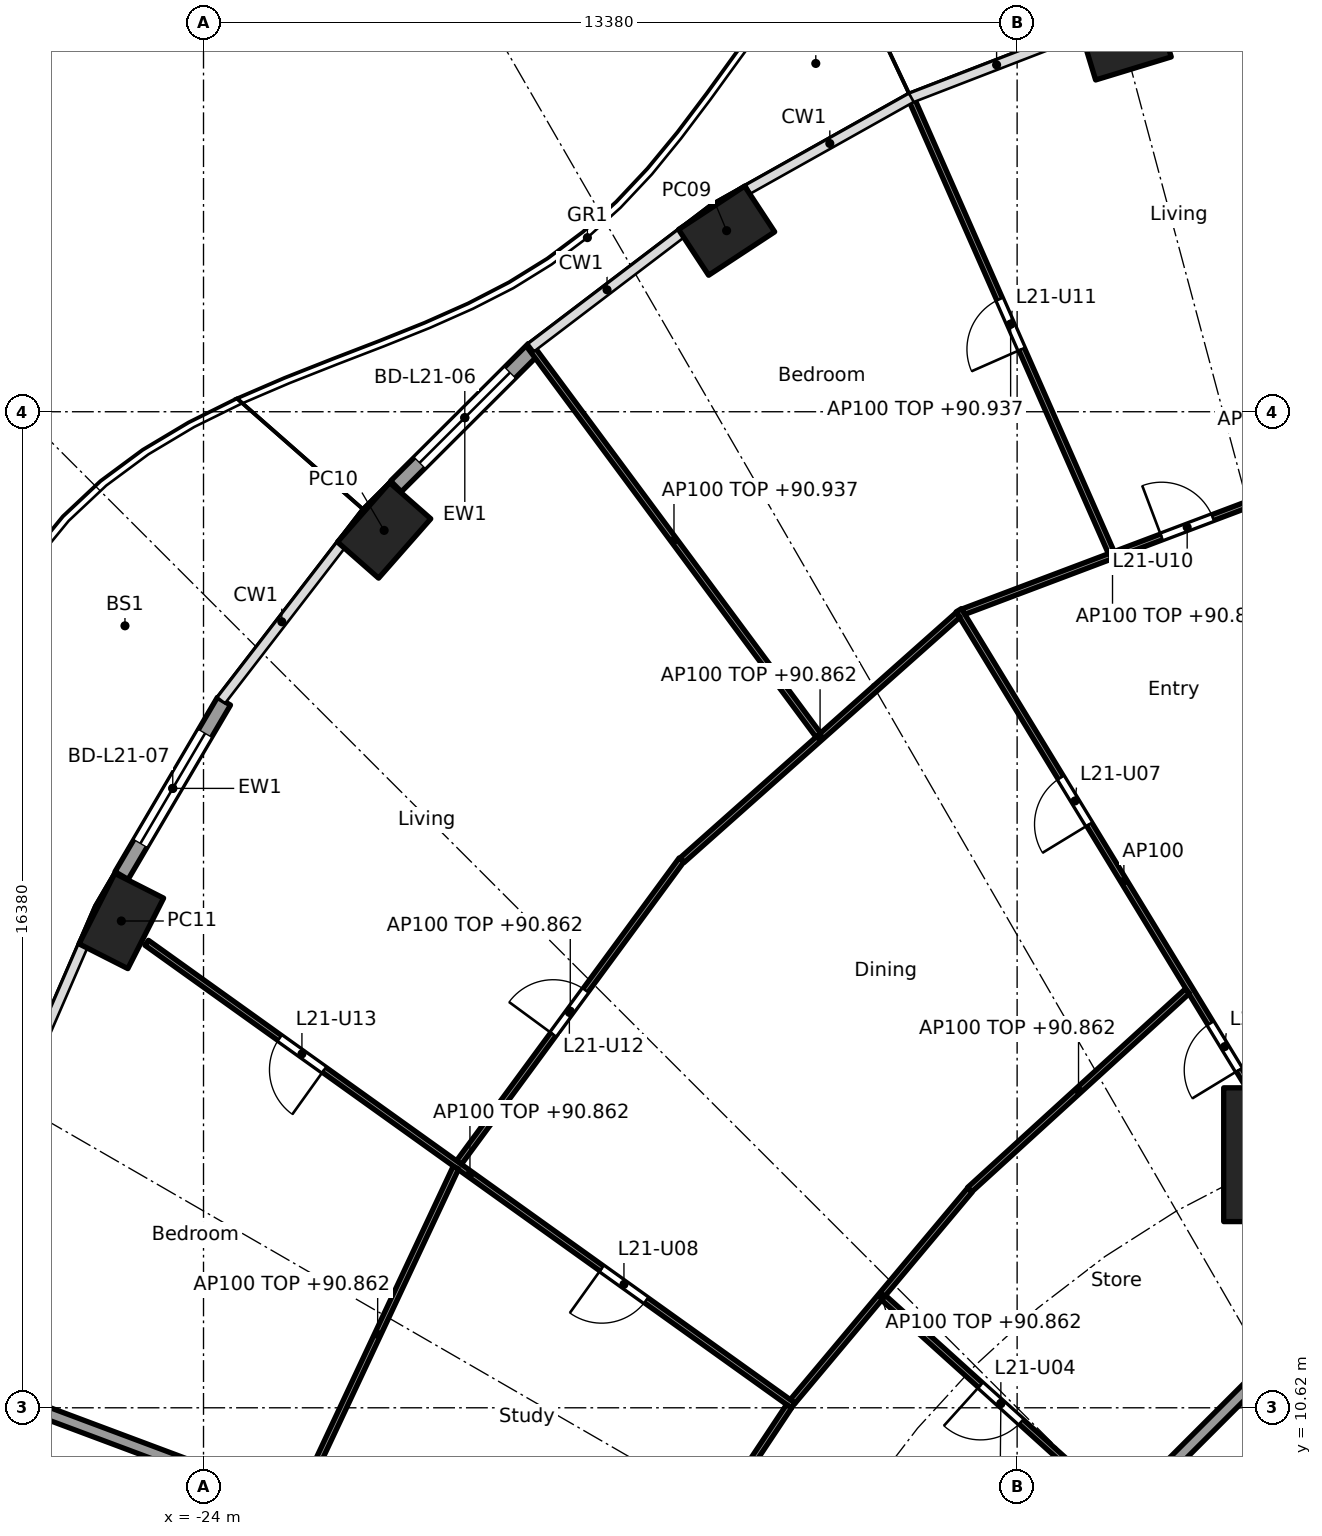
"""IFC4 building model, lengths in metres.
Left out: names, types, materials, properties, quantities, classifications, styles, units other than length and angle.
Written with IfcOpenShell. Run it as: python <this file> out.ifc"""

import sys

from ifc_helpers import new_model, si_unit, direction, frame, frame_2d, origin, origin_2d, place, context, subcontext, project, spatial, rectangle, hollow_rectangle, extrude, element, fill, save


model = new_model("IFC4")
c1 = context("Model", 3, precision=1e-05, world=origin(), true_north=direction((0.0, 1.0)))
c2 = subcontext(c1, "Body", "Model", "MODEL_VIEW")
j1 = project(units=[si_unit("LENGTHUNIT", "METRE"), si_unit("PLANEANGLEUNIT", "RADIAN")], contexts=[c1])
p1 = place(None, origin())
s1 = spatial("IfcSite", under=j1, at=p1, CompositionType="ELEMENT")
p2 = place(p1, origin())
s2 = spatial("IfcBuilding", under=s1, at=p2, CompositionType="ELEMENT")
p3 = place(p2, frame((0.0, 0.0, 88.1)))
s3 = spatial("IfcBuildingStorey", under=s2, at=p3, CompositionType="ELEMENT", Elevation=88.1)
for number, where, z_axis, x_axis in (
    (1, (-8.839, 33.076, 0.0), (0.0, 0.0, 1.0), (-0.957, -0.292, 0.0)),
    (2, (-15.397, 29.978, 0.0), (0.0, 0.0, 1.0), (-0.836, -0.549, 0.0)),
    (3, (-21.03, 25.049, 0.0), (0.0, 0.0, 1.0), (-0.66, -0.751, 0.0)),
    (4, (-25.352, 18.625, 0.0), (0.0, 0.0, 1.0), (-0.452, -0.892, 0.0)),
):
    element("IfcColumn", number, at=place(p3, frame(where, z_axis=z_axis, x_axis=x_axis)), inside=s3, PredefinedType="COLUMN", context=c2, shape_type="SweptSolid", body=[
        extrude(hollow_rectangle(XDim=1.3, YDim=0.9, WallThickness=0.045, at=origin_2d()), origin(), (0.0, 0.0, 1.0), 3.7),
    ])
p4 = place(p3, frame((-6.123, 14.782, 0.0), z_axis=(0.0, 0.0, 1.0), x_axis=(1.0, 0.0, 0.0)))
e5 = element("IfcColumn", 5, at=p4, inside=s3, PredefinedType="COLUMN", context=c2, shape_type="SweptSolid", body=[
    extrude(rectangle(XDim=2.2, YDim=2.2, at=origin_2d()), origin(), (0.0, 0.0, 1.0), 3.7),
])
p5 = place(p3, frame((-20.835, 25.773, 0.0), z_axis=(0.0, 0.0, 1.0), x_axis=(0.707831646613, 0.706381171927, 0.0)))
e6 = element("IfcWall", 6, at=p5, inside=s3, PredefinedType="SOLIDWALL", context=c2, shape_type="SweptSolid", body=[
    extrude(rectangle(XDim=3.198, YDim=0.25, at=frame_2d((1.599, 0.0))), origin(), (0.0, 0.0, 1.0), 3.44),
])
p6 = place(p5, frame((0.549, 0.0, 0.0)))
e7 = element("IfcOpeningElement", 7, at=p6, cuts=e6, PredefinedType="OPENING", context=c2, shape_type="SweptSolid", body=[
    extrude(rectangle(XDim=2.1, YDim=2.4, at=frame_2d((1.05, 1.2))), frame((0.0, 0.135, 0.0), z_axis=(0.0, -1.0, 0.0), x_axis=(1.0, 0.0, 0.0)), (0.0, 0.0, 1.0), 0.27),
])
p7 = place(p3, frame((-25.348, 19.372, 0.0), z_axis=(0.0, 0.0, 1.0), x_axis=(0.506352525095, 0.86232657406, 0.0)))
e8 = element("IfcWall", 8, at=p7, inside=s3, PredefinedType="SOLIDWALL", context=c2, shape_type="SweptSolid", body=[
    extrude(rectangle(XDim=3.325, YDim=0.25, at=frame_2d((1.663, 0.0))), origin(), (0.0, 0.0, 1.0), 3.44),
])
p8 = place(p7, frame((0.612, 0.0, 0.0)))
e9 = element("IfcOpeningElement", 9, at=p8, cuts=e8, PredefinedType="OPENING", context=c2, shape_type="SweptSolid", body=[
    extrude(rectangle(XDim=2.1, YDim=2.4, at=frame_2d((1.05, 1.2))), frame((0.0, 0.135, 0.0), z_axis=(0.0, -1.0, 0.0), x_axis=(1.0, 0.0, 0.0)), (0.0, 0.0, 1.0), 0.27),
])
p9 = place(p3, frame((-4.613, 9.988, 0.0), z_axis=(0.0, 0.0, 1.0), x_axis=(-0.707106781187, -0.707106781187, 0.0)))
e10 = element("IfcWall", 10, at=p9, inside=s3, PredefinedType="SHEAR", context=c2, shape_type="SweptSolid", body=[
    extrude(rectangle(XDim=7.602, YDim=0.6, at=frame_2d((3.801, 0.0))), origin(), (0.0, 0.0, 1.0), 3.44),
])
p10 = place(p9, frame((0.351, 0.0, 0.0)))
e11 = element("IfcOpeningElement", 11, at=p10, cuts=e10, PredefinedType="OPENING", context=c2, shape_type="SweptSolid", body=[
    extrude(rectangle(XDim=1.1, YDim=2.1, at=frame_2d((0.55, 1.05))), frame((0.0, 0.31, 0.0), z_axis=(0.0, -1.0, 0.0), x_axis=(1.0, 0.0, 0.0)), (0.0, 0.0, 1.0), 0.62),
])
p11 = place(p3, frame((-14.829, 6.14, 0.0), z_axis=(0.0, 0.0, 1.0), x_axis=(-0.936597324342, 0.35040755134, 0.0)))
e12 = element("IfcWall", 12, at=p11, inside=s3, PredefinedType="PARTITIONING", context=c2, shape_type="SweptSolid", body=[
    extrude(rectangle(XDim=13.606, YDim=0.2, at=frame_2d((6.803, 0.0))), origin(), (0.0, 0.0, 1.0), 2.762),
])
p12 = place(p3, frame((-5.275, 12.494, 0.0), z_axis=(0.0, 0.0, 1.0), x_axis=(-0.707106781187, -0.707106781187, 0.0)))
e13 = element("IfcWall", 13, at=p12, inside=s3, PredefinedType="PARTITIONING", context=c2, shape_type="SweptSolid", body=[
    extrude(rectangle(XDim=10.209, YDim=0.2, at=frame_2d((5.104, 0.0))), origin(), (0.0, 0.0, 1.0), 3.44),
])
p13 = place(p3, frame((-6.596, 25.563, 0.0), z_axis=(0.0, 0.0, 1.0), x_axis=(-0.9356162121, -0.353018843201, 0.0)))
e14 = element("IfcWall", 14, at=p13, inside=s3, PredefinedType="PARTITIONING", context=c2, shape_type="SweptSolid", body=[
    extrude(rectangle(XDim=5.249, YDim=0.1, at=frame_2d((2.625, 0.0))), origin(), (0.0, 0.0, 1.0), 2.762),
])
p14 = place(p13, frame((0.862, 0.0, 0.0)))
e15 = element("IfcOpeningElement", 15, at=p14, cuts=e14, PredefinedType="OPENING", context=c2, shape_type="SweptSolid", body=[
    extrude(rectangle(XDim=0.9, YDim=2.1, at=frame_2d((0.45, 1.05))), frame((0.0, 0.06, 0.0), z_axis=(0.0, -1.0, 0.0), x_axis=(1.0, 0.0, 0.0)), (0.0, 0.0, 1.0), 0.12),
])
p15 = place(p3, frame((-9.072, 24.683, 0.0), z_axis=(0.0, 0.0, 1.0), x_axis=(-0.403192911159, 0.915115007194, 0.0)))
e16 = element("IfcWall", 16, at=p15, inside=s3, PredefinedType="PARTITIONING", context=c2, shape_type="SweptSolid", body=[
    extrude(rectangle(XDim=8.211, YDim=0.1, at=frame_2d((4.106, 0.0))), origin(), (0.0, 0.0, 1.0), 2.837),
])
p16 = place(p15, frame((3.656, 0.0, 0.0)))
e17 = element("IfcOpeningElement", 17, at=p16, cuts=e16, PredefinedType="OPENING", context=c2, shape_type="SweptSolid", body=[
    extrude(rectangle(XDim=0.9, YDim=2.1, at=frame_2d((0.45, 1.05))), frame((0.0, 0.06, 0.0), z_axis=(0.0, -1.0, 0.0), x_axis=(1.0, 0.0, 0.0)), (0.0, 0.0, 1.0), 0.12),
])
p17 = place(p3, frame((-6.149, 14.825, 0.0), z_axis=(0.0, 0.0, 1.0), x_axis=(-0.520411490252, 0.853915616917, 0.0)))
e18 = element("IfcWall", 18, at=p17, inside=s3, PredefinedType="PARTITIONING", context=c2, shape_type="SweptSolid", body=[
    extrude(rectangle(XDim=10.435, YDim=0.1, at=frame_2d((5.218, 0.0))), origin(), (0.0, 0.0, 1.0), 3.44),
])
p18 = place(p17, frame((1.582, 0.0, 0.0)))
e19 = element("IfcOpeningElement", 19, at=p18, cuts=e18, PredefinedType="OPENING", context=c2, shape_type="SweptSolid", body=[
    extrude(rectangle(XDim=0.9, YDim=2.1, at=frame_2d((0.45, 1.05))), frame((0.0, 0.06, 0.0), z_axis=(0.0, -1.0, 0.0), x_axis=(1.0, 0.0, 0.0)), (0.0, 0.0, 1.0), 0.12),
])
p19 = place(p17, frame((6.312, 0.0, 0.0)))
e20 = element("IfcOpeningElement", 20, at=p19, cuts=e18, PredefinedType="OPENING", context=c2, shape_type="SweptSolid", body=[
    extrude(rectangle(XDim=0.9, YDim=2.1, at=frame_2d((0.45, 1.05))), frame((0.0, 0.06, 0.0), z_axis=(0.0, -1.0, 0.0), x_axis=(1.0, 0.0, 0.0)), (0.0, 0.0, 1.0), 0.12),
])
p20 = place(p3, frame((-7.82, 17.472, 0.0), z_axis=(0.0, 0.0, 1.0), x_axis=(-0.73885182489, -0.67386792538, 0.0)))
e21 = element("IfcWall", 21, at=p20, inside=s3, PredefinedType="PARTITIONING", context=c2, shape_type="SweptSolid", body=[
    extrude(rectangle(XDim=4.846, YDim=0.1, at=frame_2d((2.423, 0.0))), origin(), (0.0, 0.0, 1.0), 2.762),
])
p21 = place(p3, frame((-11.591, 23.66, 0.0), z_axis=(0.0, 0.0, 1.0), x_axis=(-0.747429278403, -0.664341383466, 0.0)))
e22 = element("IfcWall", 22, at=p21, inside=s3, PredefinedType="PARTITIONING", context=c2, shape_type="SweptSolid", body=[
    extrude(rectangle(XDim=6.073, YDim=0.1, at=frame_2d((3.037, 0.0))), origin(), (0.0, 0.0, 1.0), 2.762),
])
p22 = place(p3, frame((-13.89, 21.682, 0.0), z_axis=(0.0, 0.0, 1.0), x_axis=(-0.595256113594, 0.803536034804, 0.0)))
e23 = element("IfcWall", 23, at=p22, inside=s3, PredefinedType="PARTITIONING", context=c2, shape_type="SweptSolid", body=[
    extrude(rectangle(XDim=7.972, YDim=0.1, at=frame_2d((3.986, 0.0))), origin(), (0.0, 0.0, 1.0), 2.837),
])
p23 = place(p3, frame((-11.396, 14.202, 0.0), z_axis=(0.0, 0.0, 1.0), x_axis=(-0.642483859922, -0.766299216847, 0.0)))
e24 = element("IfcWall", 24, at=p23, inside=s3, PredefinedType="PARTITIONING", context=c2, shape_type="SweptSolid", body=[
    extrude(rectangle(XDim=4.537, YDim=0.1, at=frame_2d((2.269, 0.0))), origin(), (0.0, 0.0, 1.0), 2.762),
])
p24 = place(p3, frame((-16.138, 19.632, 0.0), z_axis=(0.0, 0.0, 1.0), x_axis=(-0.592401008469, -0.805643249314, 0.0)))
e25 = element("IfcWall", 25, at=p24, inside=s3, PredefinedType="PARTITIONING", context=c2, shape_type="SweptSolid", body=[
    extrude(rectangle(XDim=6.18, YDim=0.1, at=frame_2d((3.09, 0.0))), origin(), (0.0, 0.0, 1.0), 2.762),
])
p25 = place(p24, frame((2.665, 0.0, 0.0)))
e26 = element("IfcOpeningElement", 26, at=p25, cuts=e25, PredefinedType="OPENING", context=c2, shape_type="SweptSolid", body=[
    extrude(rectangle(XDim=0.9, YDim=2.1, at=frame_2d((0.45, 1.05))), frame((0.0, 0.06, 0.0), z_axis=(0.0, -1.0, 0.0), x_axis=(1.0, 0.0, 0.0)), (0.0, 0.0, 1.0), 0.12),
])
p26 = place(p3, frame((-8.959, 8.952, 0.0), z_axis=(0.0, 0.0, 1.0), x_axis=(-0.742686144764, 0.669639672045, 0.0)))
e27 = element("IfcWall", 27, at=p26, inside=s3, PredefinedType="PARTITIONING", context=c2, shape_type="SweptSolid", body=[
    extrude(rectangle(XDim=5.194, YDim=0.1, at=frame_2d((2.597, 0.0))), origin(), (0.0, 0.0, 1.0), 2.687),
])
p27 = place(p26, frame((2.147, 0.0, 0.0)))
e28 = element("IfcOpeningElement", 28, at=p27, cuts=e27, PredefinedType="OPENING", context=c2, shape_type="SweptSolid", body=[
    extrude(rectangle(XDim=0.9, YDim=2.1, at=frame_2d((0.45, 1.05))), frame((0.0, 0.06, 0.0), z_axis=(0.0, -1.0, 0.0), x_axis=(1.0, 0.0, 0.0)), (0.0, 0.0, 1.0), 0.12),
])
p28 = place(p3, frame((-14.302, 10.657, 0.0), z_axis=(0.0, 0.0, 1.0), x_axis=(-0.813183002698, 0.582008079087, 0.0)))
e29 = element("IfcWall", 29, at=p28, inside=s3, PredefinedType="PARTITIONING", context=c2, shape_type="SweptSolid", body=[
    extrude(rectangle(XDim=13.074, YDim=0.1, at=frame_2d((6.537, 0.0))), origin(), (0.0, 0.0, 1.0), 2.762),
])
p29 = place(p28, frame((2.973, 0.0, 0.0)))
e30 = element("IfcOpeningElement", 30, at=p29, cuts=e29, PredefinedType="OPENING", context=c2, shape_type="SweptSolid", body=[
    extrude(rectangle(XDim=0.9, YDim=2.1, at=frame_2d((0.45, 1.05))), frame((0.0, 0.06, 0.0), z_axis=(0.0, -1.0, 0.0), x_axis=(1.0, 0.0, 0.0)), (0.0, 0.0, 1.0), 0.12),
])
p30 = place(p28, frame((9.485, 0.0, 0.0)))
e31 = element("IfcOpeningElement", 31, at=p30, cuts=e29, PredefinedType="OPENING", context=c2, shape_type="SweptSolid", body=[
    extrude(rectangle(XDim=0.9, YDim=2.1, at=frame_2d((0.45, 1.05))), frame((0.0, 0.06, 0.0), z_axis=(0.0, -1.0, 0.0), x_axis=(1.0, 0.0, 0.0)), (0.0, 0.0, 1.0), 0.12),
])
p31 = place(p3, frame((-14.371, 10.645, 0.0), z_axis=(0.0, 0.0, 1.0), x_axis=(-0.553341009285, -0.832954817168, 0.0)))
e32 = element("IfcWall", 32, at=p31, inside=s3, PredefinedType="PARTITIONING", context=c2, shape_type="SweptSolid", body=[
    extrude(rectangle(XDim=4.396, YDim=0.1, at=frame_2d((2.198, 0.0))), origin(), (0.0, 0.0, 1.0), 2.762),
])
p32 = place(p3, frame((-19.85, 14.567, 0.0), z_axis=(0.0, 0.0, 1.0), x_axis=(-0.424942210745, -0.905220480064, 0.0)))
e33 = element("IfcWall", 33, at=p32, inside=s3, PredefinedType="PARTITIONING", context=c2, shape_type="SweptSolid", body=[
    extrude(rectangle(XDim=6.053, YDim=0.1, at=frame_2d((3.027, 0.0))), origin(), (0.0, 0.0, 1.0), 2.762),
])
p33 = place(p6, origin())
e34 = element("IfcDoor", 34, at=p33, inside=s3, OperationType="SLIDING_TO_LEFT", PredefinedType="DOOR", context=c2, shape_type="SweptSolid", body=[
    extrude(rectangle(XDim=2.1, YDim=2.4, at=frame_2d((1.05, 1.2))), frame((0.0, 0.025, 0.0), z_axis=(0.0, -1.0, 0.0), x_axis=(1.0, 0.0, 0.0)), (0.0, 0.0, 1.0), 0.05),
])
fill(e7, e34)
p34 = place(p8, origin())
e35 = element("IfcDoor", 35, at=p34, inside=s3, OperationType="SLIDING_TO_LEFT", PredefinedType="DOOR", context=c2, shape_type="SweptSolid", body=[
    extrude(rectangle(XDim=2.1, YDim=2.4, at=frame_2d((1.05, 1.2))), frame((0.0, 0.025, 0.0), z_axis=(0.0, -1.0, 0.0), x_axis=(1.0, 0.0, 0.0)), (0.0, 0.0, 1.0), 0.05),
])
fill(e9, e35)
p35 = place(p18, origin())
e36 = element("IfcDoor", 36, at=p35, inside=s3, OperationType="SINGLE_SWING_LEFT", PredefinedType="DOOR", context=c2, shape_type="SweptSolid", body=[
    extrude(rectangle(XDim=0.9, YDim=2.1, at=frame_2d((0.45, 1.05))), frame((0.0, 0.025, 0.0), z_axis=(0.0, -1.0, 0.0), x_axis=(1.0, 0.0, 0.0)), (0.0, 0.0, 1.0), 0.05),
])
fill(e19, e36)
p36 = place(p27, origin())
e37 = element("IfcDoor", 37, at=p36, inside=s3, OperationType="SINGLE_SWING_RIGHT", PredefinedType="DOOR", context=c2, shape_type="SweptSolid", body=[
    extrude(rectangle(XDim=0.9, YDim=2.1, at=frame_2d((0.45, 1.05))), frame((0.0, 0.025, 0.0), z_axis=(0.0, -1.0, 0.0), x_axis=(1.0, 0.0, 0.0)), (0.0, 0.0, 1.0), 0.05),
])
fill(e28, e37)
p37 = place(p19, origin())
e38 = element("IfcDoor", 38, at=p37, inside=s3, OperationType="SINGLE_SWING_LEFT", PredefinedType="DOOR", context=c2, shape_type="SweptSolid", body=[
    extrude(rectangle(XDim=0.9, YDim=2.1, at=frame_2d((0.45, 1.05))), frame((0.0, 0.025, 0.0), z_axis=(0.0, -1.0, 0.0), x_axis=(1.0, 0.0, 0.0)), (0.0, 0.0, 1.0), 0.05),
])
fill(e20, e38)
p38 = place(p29, origin())
e39 = element("IfcDoor", 39, at=p38, inside=s3, OperationType="SINGLE_SWING_RIGHT", PredefinedType="DOOR", context=c2, shape_type="SweptSolid", body=[
    extrude(rectangle(XDim=0.9, YDim=2.1, at=frame_2d((0.45, 1.05))), frame((0.0, 0.025, 0.0), z_axis=(0.0, -1.0, 0.0), x_axis=(1.0, 0.0, 0.0)), (0.0, 0.0, 1.0), 0.05),
])
fill(e30, e39)
p39 = place(p14, frame((0.9, 0.0, 0.0), x_axis=(-1.0, 0.0, 0.0)))
e40 = element("IfcDoor", 40, at=p39, inside=s3, OperationType="SINGLE_SWING_LEFT", PredefinedType="DOOR", context=c2, shape_type="SweptSolid", body=[
    extrude(rectangle(XDim=0.9, YDim=2.1, at=frame_2d((0.45, 1.05))), frame((0.0, 0.025, 0.0), z_axis=(0.0, -1.0, 0.0), x_axis=(1.0, 0.0, 0.0)), (0.0, 0.0, 1.0), 0.05),
])
fill(e15, e40)
p40 = place(p16, origin())
e41 = element("IfcDoor", 41, at=p40, inside=s3, OperationType="SINGLE_SWING_LEFT", PredefinedType="DOOR", context=c2, shape_type="SweptSolid", body=[
    extrude(rectangle(XDim=0.9, YDim=2.1, at=frame_2d((0.45, 1.05))), frame((0.0, 0.025, 0.0), z_axis=(0.0, -1.0, 0.0), x_axis=(1.0, 0.0, 0.0)), (0.0, 0.0, 1.0), 0.05),
])
fill(e17, e41)
p41 = place(p25, frame((0.9, 0.0, 0.0), x_axis=(-1.0, 0.0, 0.0)))
e42 = element("IfcDoor", 42, at=p41, inside=s3, OperationType="SINGLE_SWING_LEFT", PredefinedType="DOOR", context=c2, shape_type="SweptSolid", body=[
    extrude(rectangle(XDim=0.9, YDim=2.1, at=frame_2d((0.45, 1.05))), frame((0.0, 0.025, 0.0), z_axis=(0.0, -1.0, 0.0), x_axis=(1.0, 0.0, 0.0)), (0.0, 0.0, 1.0), 0.05),
])
fill(e26, e42)
p42 = place(p30, origin())
e43 = element("IfcDoor", 43, at=p42, inside=s3, OperationType="SINGLE_SWING_LEFT", PredefinedType="DOOR", context=c2, shape_type="SweptSolid", body=[
    extrude(rectangle(XDim=0.9, YDim=2.1, at=frame_2d((0.45, 1.05))), frame((0.0, 0.025, 0.0), z_axis=(0.0, -1.0, 0.0), x_axis=(1.0, 0.0, 0.0)), (0.0, 0.0, 1.0), 0.05),
])
fill(e31, e43)
save(model, sys.argv[1])
